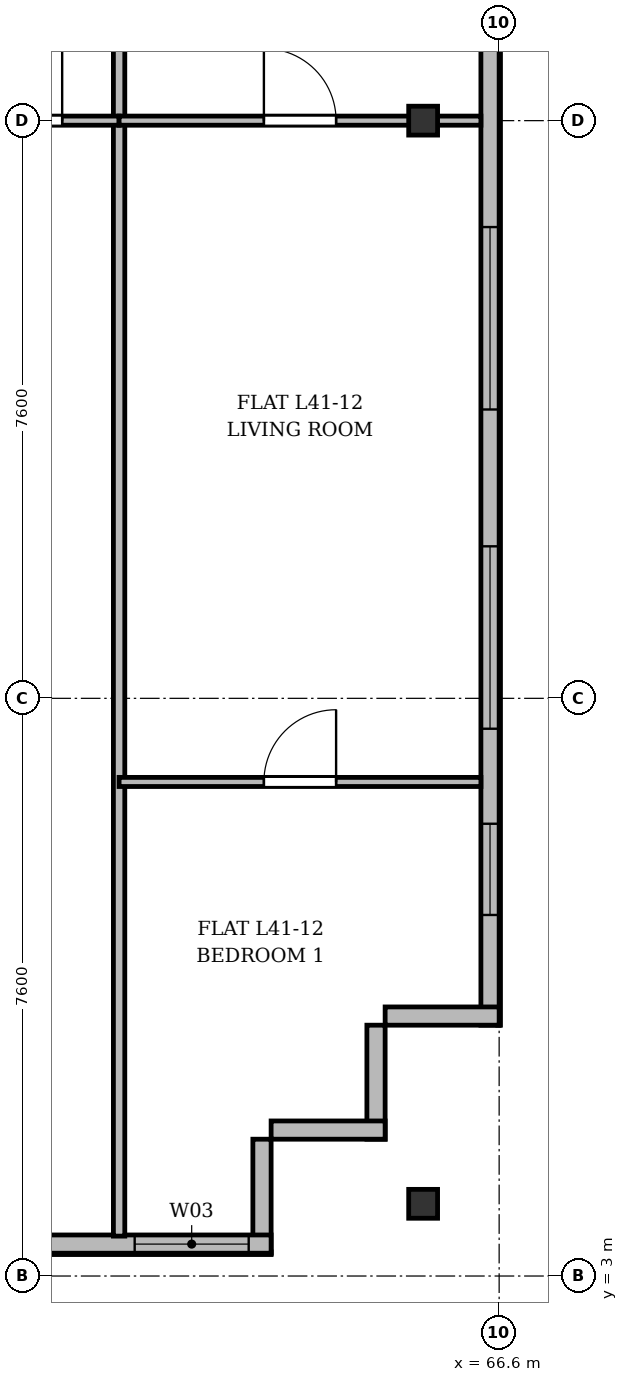
"""IFC4 building model, lengths in metres.
Left out: names, types, materials, properties, quantities, classifications, styles, units other than length and angle.
Written with IfcOpenShell. Run it as: python <this file> out.ifc"""

import sys

from ifc_helpers import new_model, si_unit, direction, frame, frame_2d, origin, origin_2d, place, context, subcontext, project, spatial, rectangle, i_section, extrude, source, transform, mapped, element, fill, save


model = new_model("IFC4")
c1 = context("Model", 3, precision=1e-05, world=origin(), true_north=direction((0.0, 1.0)))
c2 = subcontext(c1, "Body", "Model", "MODEL_VIEW")
j1 = project(units=[si_unit("LENGTHUNIT", "METRE"), si_unit("PLANEANGLEUNIT", "RADIAN")], contexts=[c1])
p1 = place(None, origin())
s1 = spatial("IfcSite", under=j1, at=p1, CompositionType="ELEMENT")
p2 = place(p1, origin())
s2 = spatial("IfcBuilding", under=s1, at=p2, CompositionType="ELEMENT")
p3 = place(p2, frame((0.0, 0.0, 157.3)))
s3 = spatial("IfcBuildingStorey", under=s2, at=p3, CompositionType="ELEMENT", Elevation=157.3)
m1 = source(origin(), c2, "Body", "SweptSolid", [
    extrude(i_section(OverallWidth=0.38, OverallDepth=0.38, WebThickness=0.02, FlangeThickness=0.03, at=origin_2d()), origin(), (0.0, 0.0, 1.0), 3.6),
])
for number, where, z_axis, x_axis in (
    (1, (65.6, 3.95, 0.0), (0.0, 0.0, 1.0), (1.0, 0.0, 0.0)),
    (2, (65.6, 18.2, 0.0), (0.0, 0.0, 1.0), (1.0, 0.0, 0.0)),
):
    element("IfcColumn", number, at=place(p3, frame(where, z_axis=z_axis, x_axis=x_axis)), inside=s3, PredefinedType="COLUMN", context=c2, shape_type="MappedRepresentation", body=[
        mapped(m1, transform((0.0, 0.0, 0.0), x_axis=(1.0, 0.0, 0.0), y_axis=(0.0, 1.0, 0.0), z_axis=(0.0, 0.0, 1.0), scale=1.0)),
    ])
p4 = place(p3, frame((66.48, 45.5, 0.0), z_axis=(0.0, 0.0, 1.0), x_axis=(0.0, -1.0, 0.0)))
e3 = element("IfcWall", 3, at=p4, inside=s3, PredefinedType="SOLIDWALL", context=c2, shape_type="SweptSolid", body=[
    extrude(rectangle(XDim=39.2, YDim=0.24, at=frame_2d((19.6, 0.0))), origin(), (0.0, 0.0, 1.0), 3.35),
])
p5 = place(p4, frame((36.55, 0.0, 0.92)))
e4 = element("IfcOpeningElement", 4, at=p5, cuts=e3, PredefinedType="OPENING", context=c2, shape_type="SweptSolid", body=[
    extrude(rectangle(XDim=1.2, YDim=1.65, at=frame_2d((0.6, 0.825))), frame((0.0, 0.13, 0.0), z_axis=(0.0, -1.0, 0.0), x_axis=(1.0, 0.0, 0.0)), (0.0, 0.0, 1.0), 0.26),
])
p6 = place(p4, frame((32.9, 0.0, 0.92)))
e5 = element("IfcOpeningElement", 5, at=p6, cuts=e3, PredefinedType="OPENING", context=c2, shape_type="SweptSolid", body=[
    extrude(rectangle(XDim=2.4, YDim=2.1, at=frame_2d((1.2, 1.05))), frame((0.0, 0.13, 0.0), z_axis=(0.0, -1.0, 0.0), x_axis=(1.0, 0.0, 0.0)), (0.0, 0.0, 1.0), 0.26),
])
p7 = place(p4, frame((28.7, 0.0, 0.92)))
e6 = element("IfcOpeningElement", 6, at=p7, cuts=e3, PredefinedType="OPENING", context=c2, shape_type="SweptSolid", body=[
    extrude(rectangle(XDim=2.4, YDim=2.1, at=frame_2d((1.2, 1.05))), frame((0.0, 0.13, 0.0), z_axis=(0.0, -1.0, 0.0), x_axis=(1.0, 0.0, 0.0)), (0.0, 0.0, 1.0), 0.26),
])
p8 = place(p4, frame((21.5, 0.0, 0.92)))
e7 = element("IfcOpeningElement", 7, at=p8, cuts=e3, PredefinedType="OPENING", context=c2, shape_type="SweptSolid", body=[
    extrude(rectangle(XDim=2.4, YDim=2.1, at=frame_2d((1.2, 1.05))), frame((0.0, 0.13, 0.0), z_axis=(0.0, -1.0, 0.0), x_axis=(1.0, 0.0, 0.0)), (0.0, 0.0, 1.0), 0.26),
])
p9 = place(p4, frame((7.5, 0.0, 0.92)))
e8 = element("IfcOpeningElement", 8, at=p9, cuts=e3, PredefinedType="OPENING", context=c2, shape_type="SweptSolid", body=[
    extrude(rectangle(XDim=2.4, YDim=2.1, at=frame_2d((1.2, 1.05))), frame((0.0, 0.13, 0.0), z_axis=(0.0, -1.0, 0.0), x_axis=(1.0, 0.0, 0.0)), (0.0, 0.0, 1.0), 0.26),
])
p10 = place(p4, frame((4.5, 0.0, 0.92)))
e9 = element("IfcOpeningElement", 9, at=p10, cuts=e3, PredefinedType="OPENING", context=c2, shape_type="SweptSolid", body=[
    extrude(rectangle(XDim=1.2, YDim=1.65, at=frame_2d((0.6, 0.825))), frame((0.0, 0.13, 0.0), z_axis=(0.0, -1.0, 0.0), x_axis=(1.0, 0.0, 0.0)), (0.0, 0.0, 1.0), 0.26),
])
p11 = place(p4, frame((1.15, 0.0, 0.92)))
e10 = element("IfcOpeningElement", 10, at=p11, cuts=e3, PredefinedType="OPENING", context=c2, shape_type="SweptSolid", body=[
    extrude(rectangle(XDim=1.2, YDim=1.65, at=frame_2d((0.6, 0.825))), frame((0.0, 0.13, 0.0), z_axis=(0.0, -1.0, 0.0), x_axis=(1.0, 0.0, 0.0)), (0.0, 0.0, 1.0), 0.26),
])
p12 = place(p3, frame((66.6, 6.42, 0.0), z_axis=(0.0, 0.0, 1.0), x_axis=(-1.0, 0.0, 0.0)))
e11 = element("IfcWall", 11, at=p12, inside=s3, PredefinedType="SOLIDWALL", context=c2, shape_type="SweptSolid", body=[
    extrude(rectangle(XDim=1.5, YDim=0.24, at=frame_2d((0.75, 0.0))), origin(), (0.0, 0.0, 1.0), 2.85),
])
for number, where, z_axis, x_axis in (
    (12, (64.98, 6.3, 0.0), (0.0, 0.0, 1.0), (0.0, -1.0, 0.0)),
    (13, (65.1, 4.92, 0.0), (0.0, 0.0, 1.0), (-1.0, 0.0, 0.0)),
):
    element("IfcWall", number, at=place(p3, frame(where, z_axis=z_axis, x_axis=x_axis)), inside=s3, PredefinedType="SOLIDWALL", context=c2, shape_type="SweptSolid", body=[
        extrude(rectangle(XDim=1.5, YDim=0.24, at=frame_2d((0.75, 0.0))), origin(), (0.0, 0.0, 1.0), 3.35),
    ])
p13 = place(p3, frame((63.48, 4.8, 0.0), z_axis=(0.0, 0.0, 1.0), x_axis=(0.0, -1.0, 0.0)))
e14 = element("IfcWall", 14, at=p13, inside=s3, PredefinedType="SOLIDWALL", context=c2, shape_type="SweptSolid", body=[
    extrude(rectangle(XDim=1.5, YDim=0.24, at=frame_2d((0.75, 0.0))), origin(), (0.0, 0.0, 1.0), 2.75),
])
p14 = place(p3, frame((63.6, 3.42, 0.0), z_axis=(0.0, 0.0, 1.0), x_axis=(-1.0, 0.0, 0.0)))
e15 = element("IfcWall", 15, at=p14, inside=s3, PredefinedType="SOLIDWALL", context=c2, shape_type="SweptSolid", body=[
    extrude(rectangle(XDim=52.8, YDim=0.24, at=frame_2d((26.4, 0.0))), origin(), (0.0, 0.0, 1.0), 3.35),
])
p15 = place(p14, frame((0.295, 0.0, 0.9)))
e16 = element("IfcOpeningElement", 16, at=p15, cuts=e15, PredefinedType="OPENING", context=c2, shape_type="SweptSolid", body=[
    extrude(rectangle(XDim=1.5, YDim=1.75, at=frame_2d((0.75, 0.875))), frame((0.0, 0.13, 0.0), z_axis=(0.0, -1.0, 0.0), x_axis=(1.0, 0.0, 0.0)), (0.0, 0.0, 1.0), 0.26),
])
p16 = place(p14, frame((3.95, 0.0, 0.9)))
e17 = element("IfcOpeningElement", 17, at=p16, cuts=e15, PredefinedType="OPENING", context=c2, shape_type="SweptSolid", body=[
    extrude(rectangle(XDim=1.5, YDim=1.75, at=frame_2d((0.75, 0.875))), frame((0.0, 0.13, 0.0), z_axis=(0.0, -1.0, 0.0), x_axis=(1.0, 0.0, 0.0)), (0.0, 0.0, 1.0), 0.26),
])
p17 = place(p14, frame((7.635, 0.0, 0.0)))
e18 = element("IfcOpeningElement", 18, at=p17, cuts=e15, PredefinedType="OPENING", context=c2, shape_type="SweptSolid", body=[
    extrude(rectangle(XDim=1.2, YDim=2.2, at=frame_2d((0.6, 1.1))), frame((0.0, 0.13, 0.0), z_axis=(0.0, -1.0, 0.0), x_axis=(1.0, 0.0, 0.0)), (0.0, 0.0, 1.0), 0.26),
])
p18 = place(p14, frame((9.775, 0.0, 0.9)))
e19 = element("IfcOpeningElement", 19, at=p18, cuts=e15, PredefinedType="OPENING", context=c2, shape_type="SweptSolid", body=[
    extrude(rectangle(XDim=1.65, YDim=1.85, at=frame_2d((0.825, 0.925))), frame((0.0, 0.13, 0.0), z_axis=(0.0, -1.0, 0.0), x_axis=(1.0, 0.0, 0.0)), (0.0, 0.0, 1.0), 0.26),
])
p19 = place(p14, frame((12.1, 0.0, 0.9)))
e20 = element("IfcOpeningElement", 20, at=p19, cuts=e15, PredefinedType="OPENING", context=c2, shape_type="SweptSolid", body=[
    extrude(rectangle(XDim=1.8, YDim=1.8, at=frame_2d((0.9, 0.9))), frame((0.0, 0.13, 0.0), z_axis=(0.0, -1.0, 0.0), x_axis=(1.0, 0.0, 0.0)), (0.0, 0.0, 1.0), 0.26),
])
p20 = place(p14, frame((15.9, 0.0, 0.9)))
e21 = element("IfcOpeningElement", 21, at=p20, cuts=e15, PredefinedType="OPENING", context=c2, shape_type="SweptSolid", body=[
    extrude(rectangle(XDim=2.2, YDim=1.8, at=frame_2d((1.1, 0.9))), frame((0.0, 0.13, 0.0), z_axis=(0.0, -1.0, 0.0), x_axis=(1.0, 0.0, 0.0)), (0.0, 0.0, 1.0), 0.26),
])
p21 = place(p14, frame((22.65, 0.0, 0.9)))
e22 = element("IfcOpeningElement", 22, at=p21, cuts=e15, PredefinedType="OPENING", context=c2, shape_type="SweptSolid", body=[
    extrude(rectangle(XDim=1.5, YDim=1.75, at=frame_2d((0.75, 0.875))), frame((0.0, 0.13, 0.0), z_axis=(0.0, -1.0, 0.0), x_axis=(1.0, 0.0, 0.0)), (0.0, 0.0, 1.0), 0.26),
])
p22 = place(p14, frame((27.5, 0.0, 0.9)))
e23 = element("IfcOpeningElement", 23, at=p22, cuts=e15, PredefinedType="OPENING", context=c2, shape_type="SweptSolid", body=[
    extrude(rectangle(XDim=2.0, YDim=1.95, at=frame_2d((1.0, 0.975))), frame((0.0, 0.13, 0.0), z_axis=(0.0, -1.0, 0.0), x_axis=(1.0, 0.0, 0.0)), (0.0, 0.0, 1.0), 0.26),
])
p23 = place(p14, frame((30.675, 0.0, 0.9)))
e24 = element("IfcOpeningElement", 24, at=p23, cuts=e15, PredefinedType="OPENING", context=c2, shape_type="SweptSolid", body=[
    extrude(rectangle(XDim=1.65, YDim=1.85, at=frame_2d((0.825, 0.925))), frame((0.0, 0.13, 0.0), z_axis=(0.0, -1.0, 0.0), x_axis=(1.0, 0.0, 0.0)), (0.0, 0.0, 1.0), 0.26),
])
p24 = place(p14, frame((34.3, 0.0, 0.9)))
e25 = element("IfcOpeningElement", 25, at=p24, cuts=e15, PredefinedType="OPENING", context=c2, shape_type="SweptSolid", body=[
    extrude(rectangle(XDim=1.8, YDim=1.8, at=frame_2d((0.9, 0.9))), frame((0.0, 0.13, 0.0), z_axis=(0.0, -1.0, 0.0), x_axis=(1.0, 0.0, 0.0)), (0.0, 0.0, 1.0), 0.26),
])
p25 = place(p14, frame((39.3, 0.0, 0.9)))
e26 = element("IfcOpeningElement", 26, at=p25, cuts=e15, PredefinedType="OPENING", context=c2, shape_type="SweptSolid", body=[
    extrude(rectangle(XDim=2.2, YDim=1.8, at=frame_2d((1.1, 0.9))), frame((0.0, 0.13, 0.0), z_axis=(0.0, -1.0, 0.0), x_axis=(1.0, 0.0, 0.0)), (0.0, 0.0, 1.0), 0.26),
])
p26 = place(p14, frame((43.65, 0.0, 0.9)))
e27 = element("IfcOpeningElement", 27, at=p26, cuts=e15, PredefinedType="OPENING", context=c2, shape_type="SweptSolid", body=[
    extrude(rectangle(XDim=1.5, YDim=1.75, at=frame_2d((0.75, 0.875))), frame((0.0, 0.13, 0.0), z_axis=(0.0, -1.0, 0.0), x_axis=(1.0, 0.0, 0.0)), (0.0, 0.0, 1.0), 0.26),
])
p27 = place(p14, frame((47.1, 0.0, 0.9)))
e28 = element("IfcOpeningElement", 28, at=p27, cuts=e15, PredefinedType="OPENING", context=c2, shape_type="SweptSolid", body=[
    extrude(rectangle(XDim=2.0, YDim=1.95, at=frame_2d((1.0, 0.975))), frame((0.0, 0.13, 0.0), z_axis=(0.0, -1.0, 0.0), x_axis=(1.0, 0.0, 0.0)), (0.0, 0.0, 1.0), 0.26),
])
p28 = place(p14, frame((51.005, 0.0, 0.9)))
e29 = element("IfcOpeningElement", 29, at=p28, cuts=e15, PredefinedType="OPENING", context=c2, shape_type="SweptSolid", body=[
    extrude(rectangle(XDim=1.5, YDim=1.75, at=frame_2d((0.75, 0.875))), frame((0.0, 0.13, 0.0), z_axis=(0.0, -1.0, 0.0), x_axis=(1.0, 0.0, 0.0)), (0.0, 0.0, 1.0), 0.26),
])
p29 = place(p14, frame((37.85, 0.0, 0.0)))
e30 = element("IfcOpeningElement", 30, at=p29, cuts=e15, PredefinedType="OPENING", context=c2, shape_type="SweptSolid", body=[
    extrude(rectangle(XDim=1.2, YDim=2.2, at=frame_2d((0.6, 1.1))), frame((0.0, 0.13, 0.0), z_axis=(0.0, -1.0, 0.0), x_axis=(1.0, 0.0, 0.0)), (0.0, 0.0, 1.0), 0.26),
])
p30 = place(p3, frame((61.6, 3.525, 0.0), z_axis=(0.0, 0.0, 1.0), x_axis=(0.0, 1.0, 0.0)))
e31 = element("IfcWall", 31, at=p30, inside=s3, PredefinedType="PARTITIONING", context=c2, shape_type="SweptSolid", body=[
    extrude(rectangle(XDim=27.275, YDim=0.15, at=frame_2d((13.638, 0.0))), origin(), (0.0, 0.0, 1.0), 2.75),
])
p31 = place(p3, frame((56.2, 18.2, 0.0), z_axis=(0.0, 0.0, 1.0), x_axis=(1.0, 0.0, 0.0)))
e32 = element("IfcWall", 32, at=p31, inside=s3, PredefinedType="PARTITIONING", context=c2, shape_type="SweptSolid", body=[
    extrude(rectangle(XDim=5.4, YDim=0.12, at=frame_2d((2.7, 0.0))), origin(), (0.0, 0.0, 1.0), 2.75),
])
p32 = place(p31, frame((3.701, 0.0, 0.0)))
e33 = element("IfcOpeningElement", 33, at=p32, cuts=e32, PredefinedType="OPENING", context=c2, shape_type="SweptSolid", body=[
    extrude(rectangle(XDim=0.95, YDim=2.15, at=frame_2d((0.475, 1.075))), frame((0.0, 0.07, 0.0), z_axis=(0.0, -1.0, 0.0), x_axis=(1.0, 0.0, 0.0)), (0.0, 0.0, 1.0), 0.14),
])
p33 = place(p3, frame((61.6, 18.2, 0.0), z_axis=(0.0, 0.0, 1.0), x_axis=(1.0, 0.0, 0.0)))
e34 = element("IfcWall", 34, at=p33, inside=s3, PredefinedType="PARTITIONING", context=c2, shape_type="SweptSolid", body=[
    extrude(rectangle(XDim=4.76, YDim=0.12, at=frame_2d((2.38, 0.0))), origin(), (0.0, 0.0, 1.0), 2.75),
])
p34 = place(p33, frame((1.905, 0.0, 0.0)))
e35 = element("IfcOpeningElement", 35, at=p34, cuts=e34, PredefinedType="OPENING", context=c2, shape_type="SweptSolid", body=[
    extrude(rectangle(XDim=0.95, YDim=2.15, at=frame_2d((0.475, 1.075))), frame((0.0, 0.07, 0.0), z_axis=(0.0, -1.0, 0.0), x_axis=(1.0, 0.0, 0.0)), (0.0, 0.0, 1.0), 0.14),
])
p35 = place(p3, frame((61.6, 9.5, 0.0), z_axis=(0.0, 0.0, 1.0), x_axis=(1.0, 0.0, 0.0)))
e36 = element("IfcWall", 36, at=p35, inside=s3, PredefinedType="PARTITIONING", context=c2, shape_type="SweptSolid", body=[
    extrude(rectangle(XDim=4.76, YDim=0.12, at=frame_2d((2.38, 0.0))), origin(), (0.0, 0.0, 1.0), 2.85),
])
p36 = place(p35, frame((1.905, 0.0, 0.0)))
e37 = element("IfcOpeningElement", 37, at=p36, cuts=e36, PredefinedType="OPENING", context=c2, shape_type="SweptSolid", body=[
    extrude(rectangle(XDim=0.95, YDim=2.15, at=frame_2d((0.475, 1.075))), frame((0.0, 0.07, 0.0), z_axis=(0.0, -1.0, 0.0), x_axis=(1.0, 0.0, 0.0)), (0.0, 0.0, 1.0), 0.14),
])
m2 = source(origin(), c2, "Body", "SweptSolid", [
    extrude(rectangle(XDim=1.2, YDim=1.65, at=frame_2d((0.6, 0.825))), frame((0.0, 0.03, 0.0), z_axis=(0.0, -1.0, 0.0), x_axis=(1.0, 0.0, 0.0)), (0.0, 0.0, 1.0), 0.06),
])
p37 = place(p5, origin())
e38 = element("IfcWindow", 38, at=p37, inside=s3, PartitioningType="SINGLE_PANEL", PredefinedType="WINDOW", context=c2, shape_type="MappedRepresentation", body=[
    mapped(m2, transform((0.0, 0.0, 0.0), x_axis=(1.0, 0.0, 0.0), y_axis=(0.0, 1.0, 0.0), z_axis=(0.0, 0.0, 1.0), scale=1.0)),
])
fill(e4, e38)
m3 = source(origin(), c2, "Body", "SweptSolid", [
    extrude(rectangle(XDim=2.4, YDim=2.1, at=frame_2d((1.2, 1.05))), frame((0.0, 0.03, 0.0), z_axis=(0.0, -1.0, 0.0), x_axis=(1.0, 0.0, 0.0)), (0.0, 0.0, 1.0), 0.06),
])
p38 = place(p6, origin())
e39 = element("IfcWindow", 39, at=p38, inside=s3, PartitioningType="SINGLE_PANEL", PredefinedType="WINDOW", context=c2, shape_type="MappedRepresentation", body=[
    mapped(m3, transform((0.0, 0.0, 0.0), x_axis=(1.0, 0.0, 0.0), y_axis=(0.0, 1.0, 0.0), z_axis=(0.0, 0.0, 1.0), scale=1.0)),
])
fill(e5, e39)
p39 = place(p7, origin())
e40 = element("IfcWindow", 40, at=p39, inside=s3, PartitioningType="SINGLE_PANEL", PredefinedType="WINDOW", context=c2, shape_type="MappedRepresentation", body=[
    mapped(m3, transform((0.0, 0.0, 0.0), x_axis=(1.0, 0.0, 0.0), y_axis=(0.0, 1.0, 0.0), z_axis=(0.0, 0.0, 1.0), scale=1.0)),
])
fill(e6, e40)
m4 = source(origin(), c2, "Body", "SweptSolid", [
    extrude(rectangle(XDim=1.5, YDim=1.75, at=frame_2d((0.75, 0.875))), frame((0.0, 0.03, 0.0), z_axis=(0.0, -1.0, 0.0), x_axis=(1.0, 0.0, 0.0)), (0.0, 0.0, 1.0), 0.06),
])
p40 = place(p15, origin())
e41 = element("IfcWindow", 41, at=p40, inside=s3, PartitioningType="SINGLE_PANEL", PredefinedType="WINDOW", context=c2, shape_type="MappedRepresentation", body=[
    mapped(m4, transform((0.0, 0.0, 0.0), x_axis=(1.0, 0.0, 0.0), y_axis=(0.0, 1.0, 0.0), z_axis=(0.0, 0.0, 1.0), scale=1.0)),
])
fill(e16, e41)
m5 = source(origin(), c2, "Body", "SweptSolid", [
    extrude(rectangle(XDim=0.95, YDim=2.15, at=frame_2d((0.475, 1.075))), frame((0.0, 0.025, 0.0), z_axis=(0.0, -1.0, 0.0), x_axis=(1.0, 0.0, 0.0)), (0.0, 0.0, 1.0), 0.05),
])
p41 = place(p32, origin())
e42 = element("IfcDoor", 42, at=p41, inside=s3, OperationType="SINGLE_SWING_RIGHT", PredefinedType="DOOR", context=c2, shape_type="MappedRepresentation", body=[
    mapped(m5, transform((0.0, 0.0, 0.0), x_axis=(1.0, 0.0, 0.0), y_axis=(0.0, 1.0, 0.0), z_axis=(0.0, 0.0, 1.0), scale=1.0)),
])
fill(e33, e42)
p42 = place(p34, origin())
e43 = element("IfcDoor", 43, at=p42, inside=s3, OperationType="SINGLE_SWING_LEFT", PredefinedType="DOOR", context=c2, shape_type="MappedRepresentation", body=[
    mapped(m5, transform((0.0, 0.0, 0.0), x_axis=(1.0, 0.0, 0.0), y_axis=(0.0, 1.0, 0.0), z_axis=(0.0, 0.0, 1.0), scale=1.0)),
])
fill(e35, e43)
p43 = place(p36, origin())
e44 = element("IfcDoor", 44, at=p43, inside=s3, OperationType="SINGLE_SWING_RIGHT", PredefinedType="DOOR", context=c2, shape_type="MappedRepresentation", body=[
    mapped(m5, transform((0.0, 0.0, 0.0), x_axis=(1.0, 0.0, 0.0), y_axis=(0.0, 1.0, 0.0), z_axis=(0.0, 0.0, 1.0), scale=1.0)),
])
fill(e37, e44)
save(model, sys.argv[1])
